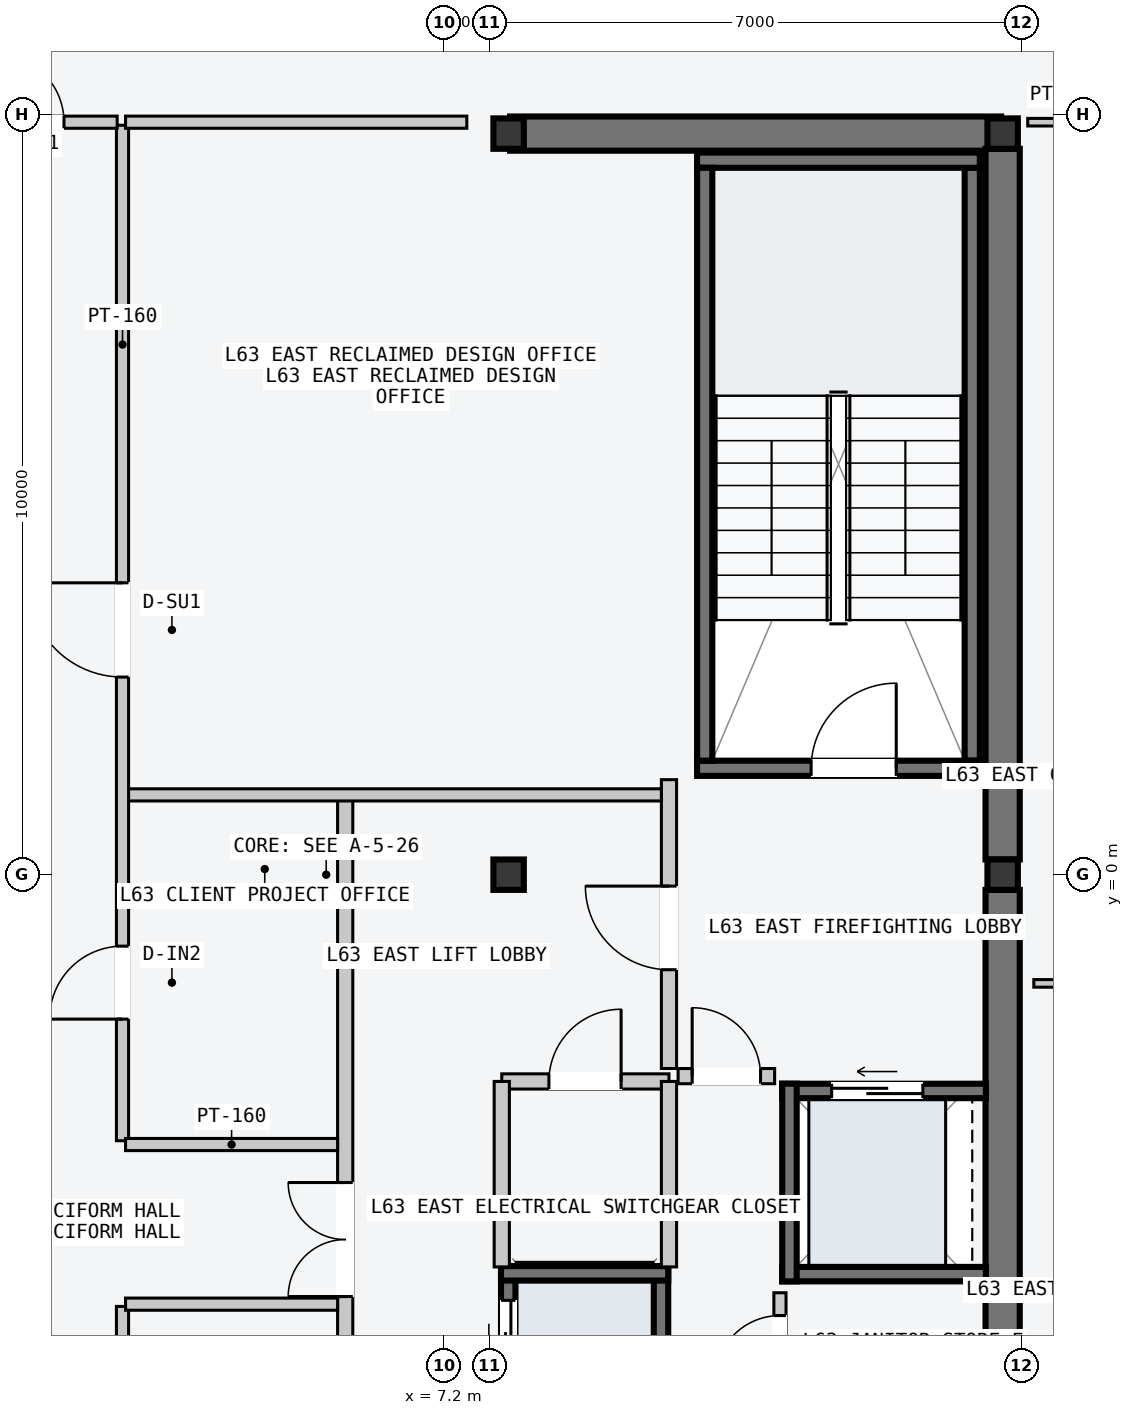
"""IFC4 building model, lengths in metres.
Left out: names, types, materials, properties, quantities, classifications, styles, units other than length and angle.
Written with IfcOpenShell. Run it as: python <this file> out.ifc"""

import sys

from ifc_helpers import new_model, si_unit, direction, frame, frame_2d, origin, origin_2d, place, context, subcontext, project, spatial, rectangle, i_section, extrude, element, fill, save


model = new_model("IFC4")
c1 = context("Model", 3, precision=1e-05, world=origin(), true_north=direction((0.0, 1.0)))
c2 = subcontext(c1, "Body", "Model", "MODEL_VIEW")
j1 = project(units=[si_unit("LENGTHUNIT", "METRE"), si_unit("PLANEANGLEUNIT", "RADIAN")], contexts=[c1])
p1 = place(None, origin())
s1 = spatial("IfcSite", under=j1, at=p1, CompositionType="ELEMENT")
p2 = place(p1, origin())
s2 = spatial("IfcBuilding", under=s1, at=p2, CompositionType="ELEMENT")
p3 = place(p2, frame((0.0, 0.0, 240.0)))
s3 = spatial("IfcBuildingStorey", under=s2, at=p3, CompositionType="ELEMENT", Elevation=240.0)
p4 = place(p3, frame((8.07, 9.75, -0.2), z_axis=(0.0, 0.0, 1.0), x_axis=(1.0, 0.0, 0.0)))
e1 = element("IfcWall", 1, at=p4, inside=s3, PredefinedType="SHEAR", context=c2, shape_type="SweptSolid", body=[
    extrude(rectangle(XDim=6.46, YDim=0.45, at=frame_2d((3.23, 0.0))), origin(), (0.0, 0.0, 1.0), 3.6),
])
for number, where, z_axis, x_axis in (
    (2, (14.55, -9.55, -0.2), (0.0, 0.0, 1.0), (0.0, 1.0, 0.0)),
    (3, (14.55, 0.2, -0.2), (0.0, 0.0, 1.0), (0.0, 1.0, 0.0)),
):
    element("IfcWall", number, at=place(p3, frame(where, z_axis=z_axis, x_axis=x_axis)), inside=s3, PredefinedType="SHEAR", context=c2, shape_type="SweptSolid", body=[
        extrude(rectangle(XDim=9.35, YDim=0.45, at=frame_2d((4.675, 0.0))), origin(), (0.0, 0.0, 1.0), 3.6),
    ])
p5 = place(p3, frame((14.15, 1.5, -0.2), z_axis=(0.0, 0.0, 1.0), x_axis=(0.0, 1.0, 0.0)))
e4 = element("IfcWall", 4, at=p5, inside=s3, PredefinedType="SOLIDWALL", context=c2, shape_type="SweptSolid", body=[
    extrude(rectangle(XDim=7.8, YDim=0.2, at=frame_2d((3.9, 0.0))), origin(), (0.0, 0.0, 1.0), 3.6),
])
p6 = place(p3, frame((10.53, 1.4, -0.2), z_axis=(0.0, 0.0, 1.0), x_axis=(1.0, 0.0, 0.0)))
e5 = element("IfcWall", 5, at=p6, inside=s3, PredefinedType="SOLIDWALL", context=c2, shape_type="SweptSolid", body=[
    extrude(rectangle(XDim=3.72, YDim=0.2, at=frame_2d((1.86, 0.0))), origin(), (0.0, 0.0, 1.0), 3.6),
])
p7 = place(p6, frame((1.5, 0.0, 0.2)))
e6 = element("IfcOpeningElement", 6, at=p7, cuts=e5, PredefinedType="OPENING", context=c2, shape_type="SweptSolid", body=[
    extrude(rectangle(XDim=1.12, YDim=2.18, at=frame_2d((0.56, 1.09))), frame((0.0, 0.11, 0.0), z_axis=(0.0, -1.0, 0.0), x_axis=(1.0, 0.0, 0.0)), (0.0, 0.0, 1.0), 0.22),
])
p8 = place(p3, frame((10.53, 9.4, -0.2), z_axis=(0.0, 0.0, 1.0), x_axis=(1.0, 0.0, 0.0)))
e7 = element("IfcWall", 7, at=p8, inside=s3, PredefinedType="SOLIDWALL", context=c2, shape_type="SweptSolid", body=[
    extrude(rectangle(XDim=3.72, YDim=0.2, at=frame_2d((1.86, 0.0))), origin(), (0.0, 0.0, 1.0), 3.6),
])
p9 = place(p3, frame((10.63, 1.5, -0.2), z_axis=(0.0, 0.0, 1.0), x_axis=(0.0, 1.0, 0.0)))
e8 = element("IfcWall", 8, at=p9, inside=s3, PredefinedType="SOLIDWALL", context=c2, shape_type="SweptSolid", body=[
    extrude(rectangle(XDim=7.8, YDim=0.2, at=frame_2d((3.9, 0.0))), origin(), (0.0, 0.0, 1.0), 3.6),
])
for number, where, z_axis, x_axis in (
    (9, (8.05, 0.0, 0.0), (0.0, 0.0, 1.0), (1.0, 0.0, 0.0)),
    (10, (8.05, 9.75, 0.0), (0.0, 0.0, 1.0), (1.0, 0.0, 0.0)),
    (11, (14.55, 0.0, 0.0), (0.0, 0.0, 1.0), (1.0, 0.0, 0.0)),
    (12, (14.55, 9.75, 0.0), (0.0, 0.0, 1.0), (1.0, 0.0, 0.0)),
):
    element("IfcColumn", number, at=place(p3, frame(where, z_axis=z_axis, x_axis=x_axis)), inside=s3, PredefinedType="COLUMN", context=c2, shape_type="SweptSolid", body=[
        extrude(i_section(OverallWidth=0.4, OverallDepth=0.4, WebThickness=0.013, FlangeThickness=0.021, at=origin_2d()), origin(), (0.0, 0.0, 1.0), 3.6),
    ])
p10 = place(p3, frame((8.045, -7.15, -0.2), z_axis=(0.0, 0.0, 1.0), x_axis=(0.0, 1.0, 0.0)))
e13 = element("IfcWall", 13, at=p10, inside=s3, PredefinedType="SOLIDWALL", context=c2, shape_type="SweptSolid", body=[
    extrude(rectangle(XDim=2.0, YDim=0.19, at=frame_2d((1.0, 0.0))), origin(), (0.0, 0.0, 1.0), 3.6),
])
p11 = place(p10, frame((0.45, 0.0, 0.2)))
e14 = element("IfcOpeningElement", 14, at=p11, cuts=e13, PredefinedType="OPENING", context=c2, shape_type="SweptSolid", body=[
    extrude(rectangle(XDim=1.1, YDim=2.2, at=frame_2d((0.55, 1.1))), frame((0.0, 0.105, 0.0), z_axis=(0.0, -1.0, 0.0), x_axis=(1.0, 0.0, 0.0)), (0.0, 0.0, 1.0), 0.21),
])
p12 = place(p3, frame((10.055, -7.15, -0.2), z_axis=(0.0, 0.0, 1.0), x_axis=(0.0, 1.0, 0.0)))
e15 = element("IfcWall", 15, at=p12, inside=s3, PredefinedType="SOLIDWALL", context=c2, shape_type="SweptSolid", body=[
    extrude(rectangle(XDim=2.0, YDim=0.19, at=frame_2d((1.0, 0.0))), origin(), (0.0, 0.0, 1.0), 3.6),
])
p13 = place(p3, frame((7.95, -5.245, -0.2), z_axis=(0.0, 0.0, 1.0), x_axis=(1.0, 0.0, 0.0)))
e16 = element("IfcWall", 16, at=p13, inside=s3, PredefinedType="SOLIDWALL", context=c2, shape_type="SweptSolid", body=[
    extrude(rectangle(XDim=2.2, YDim=0.19, at=frame_2d((1.1, 0.0))), origin(), (0.0, 0.0, 1.0), 3.6),
])
p14 = place(p3, frame((11.65, -2.845, -0.2), z_axis=(0.0, 0.0, 1.0), x_axis=(1.0, 0.0, 0.0)))
e17 = element("IfcWall", 17, at=p14, inside=s3, PredefinedType="SOLIDWALL", context=c2, shape_type="SweptSolid", body=[
    extrude(rectangle(XDim=2.68, YDim=0.19, at=frame_2d((1.34, 0.0))), origin(), (0.0, 0.0, 1.0), 3.6),
])
p15 = place(p14, frame((0.65, 0.0, 0.2)))
e18 = element("IfcOpeningElement", 18, at=p15, cuts=e17, PredefinedType="OPENING", context=c2, shape_type="SweptSolid", body=[
    extrude(rectangle(XDim=1.2, YDim=2.2, at=frame_2d((0.6, 1.1))), frame((0.0, 0.105, 0.0), z_axis=(0.0, -1.0, 0.0), x_axis=(1.0, 0.0, 0.0)), (0.0, 0.0, 1.0), 0.21),
])
p16 = place(p3, frame((11.65, -5.255, -0.2), z_axis=(0.0, 0.0, 1.0), x_axis=(1.0, 0.0, 0.0)))
e19 = element("IfcWall", 19, at=p16, inside=s3, PredefinedType="SOLIDWALL", context=c2, shape_type="SweptSolid", body=[
    extrude(rectangle(XDim=2.68, YDim=0.19, at=frame_2d((1.34, 0.0))), origin(), (0.0, 0.0, 1.0), 3.6),
])
p17 = place(p3, frame((11.745, -5.35, -0.2), z_axis=(0.0, 0.0, 1.0), x_axis=(0.0, 1.0, 0.0)))
e20 = element("IfcWall", 20, at=p17, inside=s3, PredefinedType="SOLIDWALL", context=c2, shape_type="SweptSolid", body=[
    extrude(rectangle(XDim=2.6, YDim=0.19, at=frame_2d((1.3, 0.0))), origin(), (0.0, 0.0, 1.0), 3.6),
])
p18 = place(p3, frame((5.9, -9.45, 0.0), z_axis=(0.0, 0.0, 1.0), x_axis=(0.0, 1.0, 0.0)))
e21 = element("IfcWall", 21, at=p18, inside=s3, PredefinedType="PARTITIONING", context=c2, shape_type="SweptSolid", body=[
    extrude(rectangle(XDim=10.5, YDim=0.2, at=frame_2d((5.25, 0.0))), origin(), (0.0, 0.0, 1.0), 3.4),
])
p19 = place(p18, frame((3.9, 0.0, 0.0)))
e22 = element("IfcOpeningElement", 22, at=p19, cuts=e21, PredefinedType="OPENING", context=c2, shape_type="SweptSolid", body=[
    extrude(rectangle(XDim=1.5, YDim=2.2, at=frame_2d((0.75, 1.1))), frame((0.0, 0.11, 0.0), z_axis=(0.0, -1.0, 0.0), x_axis=(1.0, 0.0, 0.0)), (0.0, 0.0, 1.0), 0.22),
])
p20 = place(p3, frame((10.16, -2.55, 0.0), z_axis=(0.0, 0.0, 1.0), x_axis=(0.0, 1.0, 0.0)))
e23 = element("IfcWall", 23, at=p20, inside=s3, PredefinedType="PARTITIONING", context=c2, shape_type="SweptSolid", body=[
    extrude(rectangle(XDim=3.8, YDim=0.2, at=frame_2d((1.9, 0.0))), origin(), (0.0, 0.0, 1.0), 3.4),
])
p21 = place(p20, frame((1.3, 0.0, 0.0)))
e24 = element("IfcOpeningElement", 24, at=p21, cuts=e23, PredefinedType="OPENING", context=c2, shape_type="SweptSolid", body=[
    extrude(rectangle(XDim=1.1, YDim=2.15, at=frame_2d((0.55, 1.075))), frame((0.0, 0.11, 0.0), z_axis=(0.0, -1.0, 0.0), x_axis=(1.0, 0.0, 0.0)), (0.0, 0.0, 1.0), 0.22),
])
p22 = place(p3, frame((10.28, -2.65, 0.0), z_axis=(0.0, 0.0, 1.0), x_axis=(1.0, 0.0, 0.0)))
e25 = element("IfcWall", 25, at=p22, inside=s3, PredefinedType="PARTITIONING", context=c2, shape_type="SweptSolid", body=[
    extrude(rectangle(XDim=1.27, YDim=0.2, at=frame_2d((0.635, 0.0))), origin(), (0.0, 0.0, 1.0), 3.4),
])
p23 = place(p22, frame((0.185, 0.0, 0.0)))
e26 = element("IfcOpeningElement", 26, at=p23, cuts=e25, PredefinedType="OPENING", context=c2, shape_type="SweptSolid", body=[
    extrude(rectangle(XDim=0.9, YDim=2.15, at=frame_2d((0.45, 1.075))), frame((0.0, 0.11, 0.0), z_axis=(0.0, -1.0, 0.0), x_axis=(1.0, 0.0, 0.0)), (0.0, 0.0, 1.0), 0.22),
])
p24 = place(p3, frame((7.96, -2.72, 0.0), z_axis=(0.0, 0.0, 1.0), x_axis=(1.0, 0.0, 0.0)))
e27 = element("IfcWall", 27, at=p24, inside=s3, PredefinedType="PARTITIONING", context=c2, shape_type="SweptSolid", body=[
    extrude(rectangle(XDim=2.2, YDim=0.2, at=frame_2d((1.1, 0.0))), origin(), (0.0, 0.0, 1.0), 3.4),
])
p25 = place(p24, frame((0.62, 0.0, 0.0)))
e28 = element("IfcOpeningElement", 28, at=p25, cuts=e27, PredefinedType="OPENING", context=c2, shape_type="SweptSolid", body=[
    extrude(rectangle(XDim=0.95, YDim=2.1, at=frame_2d((0.475, 1.05))), frame((0.0, 0.11, 0.0), z_axis=(0.0, -1.0, 0.0), x_axis=(1.0, 0.0, 0.0)), (0.0, 0.0, 1.0), 0.22),
])
for number, where, z_axis, x_axis in (
    (29, (7.96, -5.16, 0.0), (0.0, 0.0, 1.0), (0.0, 1.0, 0.0)),
    (30, (10.16, -5.16, 0.0), (0.0, 0.0, 1.0), (0.0, 1.0, 0.0)),
):
    element("IfcWall", number, at=place(p3, frame(where, z_axis=z_axis, x_axis=x_axis)), inside=s3, PredefinedType="PARTITIONING", context=c2, shape_type="SweptSolid", body=[
        extrude(rectangle(XDim=2.44, YDim=0.2, at=frame_2d((1.22, 0.0))), origin(), (0.0, 0.0, 1.0), 3.4),
    ])
p26 = place(p3, frame((11.62, -9.35, 0.0), z_axis=(0.0, 0.0, 1.0), x_axis=(0.0, 1.0, 0.0)))
e31 = element("IfcWall", 31, at=p26, inside=s3, PredefinedType="PARTITIONING", context=c2, shape_type="SweptSolid", body=[
    extrude(rectangle(XDim=3.85, YDim=0.16, at=frame_2d((1.925, 0.0))), origin(), (0.0, 0.0, 1.0), 3.4),
])
p27 = place(p26, frame((0.3, 0.0, 0.0)))
e32 = element("IfcOpeningElement", 32, at=p27, cuts=e31, PredefinedType="OPENING", context=c2, shape_type="SweptSolid", body=[
    extrude(rectangle(XDim=0.85, YDim=2.12, at=frame_2d((0.425, 1.06))), frame((0.0, 0.09, 0.0), z_axis=(0.0, -1.0, 0.0), x_axis=(1.0, 0.0, 0.0)), (0.0, 0.0, 1.0), 0.18),
])
p28 = place(p26, frame((1.5, 0.0, 0.0)))
e33 = element("IfcOpeningElement", 33, at=p28, cuts=e31, PredefinedType="OPENING", context=c2, shape_type="SweptSolid", body=[
    extrude(rectangle(XDim=0.85, YDim=2.12, at=frame_2d((0.425, 1.06))), frame((0.0, 0.09, 0.0), z_axis=(0.0, -1.0, 0.0), x_axis=(1.0, 0.0, 0.0)), (0.0, 0.0, 1.0), 0.18),
])
p29 = place(p26, frame((2.7, 0.0, 0.0)))
e34 = element("IfcOpeningElement", 34, at=p29, cuts=e31, PredefinedType="OPENING", context=c2, shape_type="SweptSolid", body=[
    extrude(rectangle(XDim=0.85, YDim=2.12, at=frame_2d((0.425, 1.06))), frame((0.0, 0.09, 0.0), z_axis=(0.0, -1.0, 0.0), x_axis=(1.0, 0.0, 0.0)), (0.0, 0.0, 1.0), 0.18),
])
p30 = place(p3, frame((3.01, 1.05, 0.0), z_axis=(0.0, 0.0, 1.0), x_axis=(1.0, 0.0, 0.0)))
e35 = element("IfcWall", 35, at=p30, inside=s3, PredefinedType="PARTITIONING", context=c2, shape_type="SweptSolid", body=[
    extrude(rectangle(XDim=7.05, YDim=0.16, at=frame_2d((3.525, 0.0))), origin(), (0.0, 0.0, 1.0), 3.4),
])
p31 = place(p3, frame((2.97, -3.5, 0.0), z_axis=(0.0, 0.0, 1.0), x_axis=(0.0, 1.0, 0.0)))
e36 = element("IfcWall", 36, at=p31, inside=s3, PredefinedType="PARTITIONING", context=c2, shape_type="SweptSolid", body=[
    extrude(rectangle(XDim=13.36, YDim=0.16, at=frame_2d((6.68, 0.0))), origin(), (0.0, 0.0, 1.0), 3.4),
])
p32 = place(p31, frame((6.1, 0.0, 0.0)))
e37 = element("IfcOpeningElement", 37, at=p32, cuts=e36, PredefinedType="OPENING", context=c2, shape_type="SweptSolid", body=[
    extrude(rectangle(XDim=1.24, YDim=2.24, at=frame_2d((0.62, 1.12))), frame((0.0, 0.09, 0.0), z_axis=(0.0, -1.0, 0.0), x_axis=(1.0, 0.0, 0.0)), (0.0, 0.0, 1.0), 0.18),
])
p33 = place(p31, frame((1.6, 0.0, 0.0)))
e38 = element("IfcOpeningElement", 38, at=p33, cuts=e36, PredefinedType="OPENING", context=c2, shape_type="SweptSolid", body=[
    extrude(rectangle(XDim=0.96, YDim=2.18, at=frame_2d((0.48, 1.09))), frame((0.0, 0.09, 0.0), z_axis=(0.0, -1.0, 0.0), x_axis=(1.0, 0.0, 0.0)), (0.0, 0.0, 1.0), 0.18),
])
p34 = place(p3, frame((3.01, 9.9, 0.0), z_axis=(0.0, 0.0, 1.0), x_axis=(1.0, 0.0, 0.0)))
e39 = element("IfcWall", 39, at=p34, inside=s3, PredefinedType="PARTITIONING", context=c2, shape_type="SweptSolid", body=[
    extrude(rectangle(XDim=4.49, YDim=0.16, at=frame_2d((2.245, 0.0))), origin(), (0.0, 0.0, 1.0), 3.4),
])
p35 = place(p3, frame((3.01, -3.55, 0.0), z_axis=(0.0, 0.0, 1.0), x_axis=(1.0, 0.0, 0.0)))
e40 = element("IfcWall", 40, at=p35, inside=s3, PredefinedType="PARTITIONING", context=c2, shape_type="SweptSolid", body=[
    extrude(rectangle(XDim=2.79, YDim=0.16, at=frame_2d((1.395, 0.0))), origin(), (0.0, 0.0, 1.0), 3.4),
])
p36 = place(p3, frame((2.97, -10.17, 0.0), z_axis=(0.0, 0.0, 1.0), x_axis=(0.0, 1.0, 0.0)))
e41 = element("IfcWall", 41, at=p36, inside=s3, PredefinedType="PARTITIONING", context=c2, shape_type="SweptSolid", body=[
    extrude(rectangle(XDim=4.49, YDim=0.16, at=frame_2d((2.245, 0.0))), origin(), (0.0, 0.0, 1.0), 3.4),
])
p37 = place(p36, frame((1.15, 0.0, 0.0)))
e42 = element("IfcOpeningElement", 42, at=p37, cuts=e41, PredefinedType="OPENING", context=c2, shape_type="SweptSolid", body=[
    extrude(rectangle(XDim=0.96, YDim=2.18, at=frame_2d((0.48, 1.09))), frame((0.0, 0.09, 0.0), z_axis=(0.0, -1.0, 0.0), x_axis=(1.0, 0.0, 0.0)), (0.0, 0.0, 1.0), 0.18),
])
p38 = place(p3, frame((3.01, -5.65, 0.0), z_axis=(0.0, 0.0, 1.0), x_axis=(1.0, 0.0, 0.0)))
e43 = element("IfcWall", 43, at=p38, inside=s3, PredefinedType="PARTITIONING", context=c2, shape_type="SweptSolid", body=[
    extrude(rectangle(XDim=2.79, YDim=0.16, at=frame_2d((1.395, 0.0))), origin(), (0.0, 0.0, 1.0), 3.4),
])
p39 = place(p3, frame((0.6, 9.9, 0.0), z_axis=(0.0, 0.0, 1.0), x_axis=(1.0, 0.0, 0.0)))
e44 = element("IfcWall", 44, at=p39, inside=s3, PredefinedType="PARTITIONING", context=c2, shape_type="SweptSolid", body=[
    extrude(rectangle(XDim=2.3, YDim=0.16, at=frame_2d((1.15, 0.0))), origin(), (0.0, 0.0, 1.0), 3.4),
])
p40 = place(p39, frame((0.7, 0.0, 0.0)))
e45 = element("IfcOpeningElement", 45, at=p40, cuts=e44, PredefinedType="OPENING", context=c2, shape_type="SweptSolid", body=[
    extrude(rectangle(XDim=0.9, YDim=2.15, at=frame_2d((0.45, 1.075))), frame((0.0, 0.09, 0.0), z_axis=(0.0, -1.0, 0.0), x_axis=(1.0, 0.0, 0.0)), (0.0, 0.0, 1.0), 0.18),
])
p41 = place(p3, frame((14.88, 9.9, 0.0), z_axis=(0.0, 0.0, 1.0), x_axis=(1.0, 0.0, 0.0)))
e46 = element("IfcWall", 46, at=p41, inside=s3, PredefinedType="PARTITIONING", context=c2, shape_type="SweptSolid", body=[
    extrude(rectangle(XDim=3.68, YDim=0.1, at=frame_2d((1.84, 0.0))), origin(), (0.0, 0.0, 1.0), 3.4),
])
p42 = place(p41, frame((1.22, 0.0, 0.0)))
e47 = element("IfcOpeningElement", 47, at=p42, cuts=e46, PredefinedType="OPENING", context=c2, shape_type="SweptSolid", body=[
    extrude(rectangle(XDim=1.24, YDim=2.24, at=frame_2d((0.62, 1.12))), frame((0.0, 0.06, 0.0), z_axis=(0.0, -1.0, 0.0), x_axis=(1.0, 0.0, 0.0)), (0.0, 0.0, 1.0), 0.12),
])
p43 = place(p3, frame((14.96, -1.43, 0.0), z_axis=(0.0, 0.0, 1.0), x_axis=(1.0, 0.0, 0.0)))
e48 = element("IfcWall", 48, at=p43, inside=s3, PredefinedType="PARTITIONING", context=c2, shape_type="SweptSolid", body=[
    extrude(rectangle(XDim=2.59, YDim=0.1, at=frame_2d((1.295, 0.0))), origin(), (0.0, 0.0, 1.0), 3.4),
])
p44 = place(p43, frame((0.9, 0.0, 0.0)))
e49 = element("IfcOpeningElement", 49, at=p44, cuts=e48, PredefinedType="OPENING", context=c2, shape_type="SweptSolid", body=[
    extrude(rectangle(XDim=0.96, YDim=2.18, at=frame_2d((0.48, 1.09))), frame((0.0, 0.06, 0.0), z_axis=(0.0, -1.0, 0.0), x_axis=(1.0, 0.0, 0.0)), (0.0, 0.0, 1.0), 0.12),
])
p45 = place(p7, origin())
e50 = element("IfcDoor", 50, at=p45, inside=s3, OperationType="SINGLE_SWING_RIGHT", PredefinedType="DOOR", context=c2, shape_type="SweptSolid", body=[
    extrude(rectangle(XDim=1.12, YDim=2.18, at=frame_2d((0.56, 1.09))), frame((0.0, 0.025, 0.0), z_axis=(0.0, -1.0, 0.0), x_axis=(1.0, 0.0, 0.0)), (0.0, 0.0, 1.0), 0.05),
])
fill(e6, e50)
p46 = place(p11, origin())
e51 = element("IfcDoor", 51, at=p46, inside=s3, OperationType="SLIDING_TO_LEFT", PredefinedType="DOOR", context=c2, shape_type="SweptSolid", body=[
    extrude(rectangle(XDim=1.1, YDim=2.2, at=frame_2d((0.55, 1.1))), frame((0.0, 0.025, 0.0), z_axis=(0.0, -1.0, 0.0), x_axis=(1.0, 0.0, 0.0)), (0.0, 0.0, 1.0), 0.05),
])
fill(e14, e51)
p47 = place(p15, origin())
e52 = element("IfcDoor", 52, at=p47, inside=s3, OperationType="SLIDING_TO_LEFT", PredefinedType="DOOR", context=c2, shape_type="SweptSolid", body=[
    extrude(rectangle(XDim=1.2, YDim=2.2, at=frame_2d((0.6, 1.1))), frame((0.0, 0.025, 0.0), z_axis=(0.0, -1.0, 0.0), x_axis=(1.0, 0.0, 0.0)), (0.0, 0.0, 1.0), 0.05),
])
fill(e18, e52)
p48 = place(p19, origin())
e53 = element("IfcDoor", 53, at=p48, inside=s3, OperationType="DOUBLE_DOOR_SINGLE_SWING", PredefinedType="DOOR", context=c2, shape_type="SweptSolid", body=[
    extrude(rectangle(XDim=1.5, YDim=2.2, at=frame_2d((0.75, 1.1))), frame((0.0, 0.025, 0.0), z_axis=(0.0, -1.0, 0.0), x_axis=(1.0, 0.0, 0.0)), (0.0, 0.0, 1.0), 0.05),
])
fill(e22, e53)
p49 = place(p21, origin())
e54 = element("IfcDoor", 54, at=p49, inside=s3, OperationType="SINGLE_SWING_RIGHT", PredefinedType="DOOR", context=c2, shape_type="SweptSolid", body=[
    extrude(rectangle(XDim=1.1, YDim=2.15, at=frame_2d((0.55, 1.075))), frame((0.0, 0.025, 0.0), z_axis=(0.0, -1.0, 0.0), x_axis=(1.0, 0.0, 0.0)), (0.0, 0.0, 1.0), 0.05),
])
fill(e24, e54)
p50 = place(p23, origin())
e55 = element("IfcDoor", 55, at=p50, inside=s3, OperationType="SINGLE_SWING_LEFT", PredefinedType="DOOR", context=c2, shape_type="SweptSolid", body=[
    extrude(rectangle(XDim=0.9, YDim=2.15, at=frame_2d((0.45, 1.075))), frame((0.0, 0.025, 0.0), z_axis=(0.0, -1.0, 0.0), x_axis=(1.0, 0.0, 0.0)), (0.0, 0.0, 1.0), 0.05),
])
fill(e26, e55)
p51 = place(p25, origin())
e56 = element("IfcDoor", 56, at=p51, inside=s3, OperationType="SINGLE_SWING_RIGHT", PredefinedType="DOOR", context=c2, shape_type="SweptSolid", body=[
    extrude(rectangle(XDim=0.95, YDim=2.1, at=frame_2d((0.475, 1.05))), frame((0.0, 0.025, 0.0), z_axis=(0.0, -1.0, 0.0), x_axis=(1.0, 0.0, 0.0)), (0.0, 0.0, 1.0), 0.05),
])
fill(e28, e56)
p52 = place(p29, origin())
e57 = element("IfcDoor", 57, at=p52, inside=s3, OperationType="SINGLE_SWING_LEFT", PredefinedType="DOOR", context=c2, shape_type="SweptSolid", body=[
    extrude(rectangle(XDim=0.85, YDim=2.12, at=frame_2d((0.425, 1.06))), frame((0.0, 0.025, 0.0), z_axis=(0.0, -1.0, 0.0), x_axis=(1.0, 0.0, 0.0)), (0.0, 0.0, 1.0), 0.05),
])
fill(e34, e57)
p53 = place(p32, origin())
e58 = element("IfcDoor", 58, at=p53, inside=s3, OperationType="SINGLE_SWING_RIGHT", PredefinedType="DOOR", context=c2, shape_type="SweptSolid", body=[
    extrude(rectangle(XDim=1.24, YDim=2.24, at=frame_2d((0.62, 1.12))), frame((0.0, 0.025, 0.0), z_axis=(0.0, -1.0, 0.0), x_axis=(1.0, 0.0, 0.0)), (0.0, 0.0, 1.0), 0.05),
])
fill(e37, e58)
p54 = place(p33, origin())
e59 = element("IfcDoor", 59, at=p54, inside=s3, OperationType="SINGLE_SWING_LEFT", PredefinedType="DOOR", context=c2, shape_type="SweptSolid", body=[
    extrude(rectangle(XDim=0.96, YDim=2.18, at=frame_2d((0.48, 1.09))), frame((0.0, 0.025, 0.0), z_axis=(0.0, -1.0, 0.0), x_axis=(1.0, 0.0, 0.0)), (0.0, 0.0, 1.0), 0.05),
])
fill(e38, e59)
p55 = place(p40, origin())
e60 = element("IfcDoor", 60, at=p55, inside=s3, OperationType="SINGLE_SWING_LEFT", PredefinedType="DOOR", context=c2, shape_type="SweptSolid", body=[
    extrude(rectangle(XDim=0.9, YDim=2.15, at=frame_2d((0.45, 1.075))), frame((0.0, 0.025, 0.0), z_axis=(0.0, -1.0, 0.0), x_axis=(1.0, 0.0, 0.0)), (0.0, 0.0, 1.0), 0.05),
])
fill(e45, e60)
save(model, sys.argv[1])
